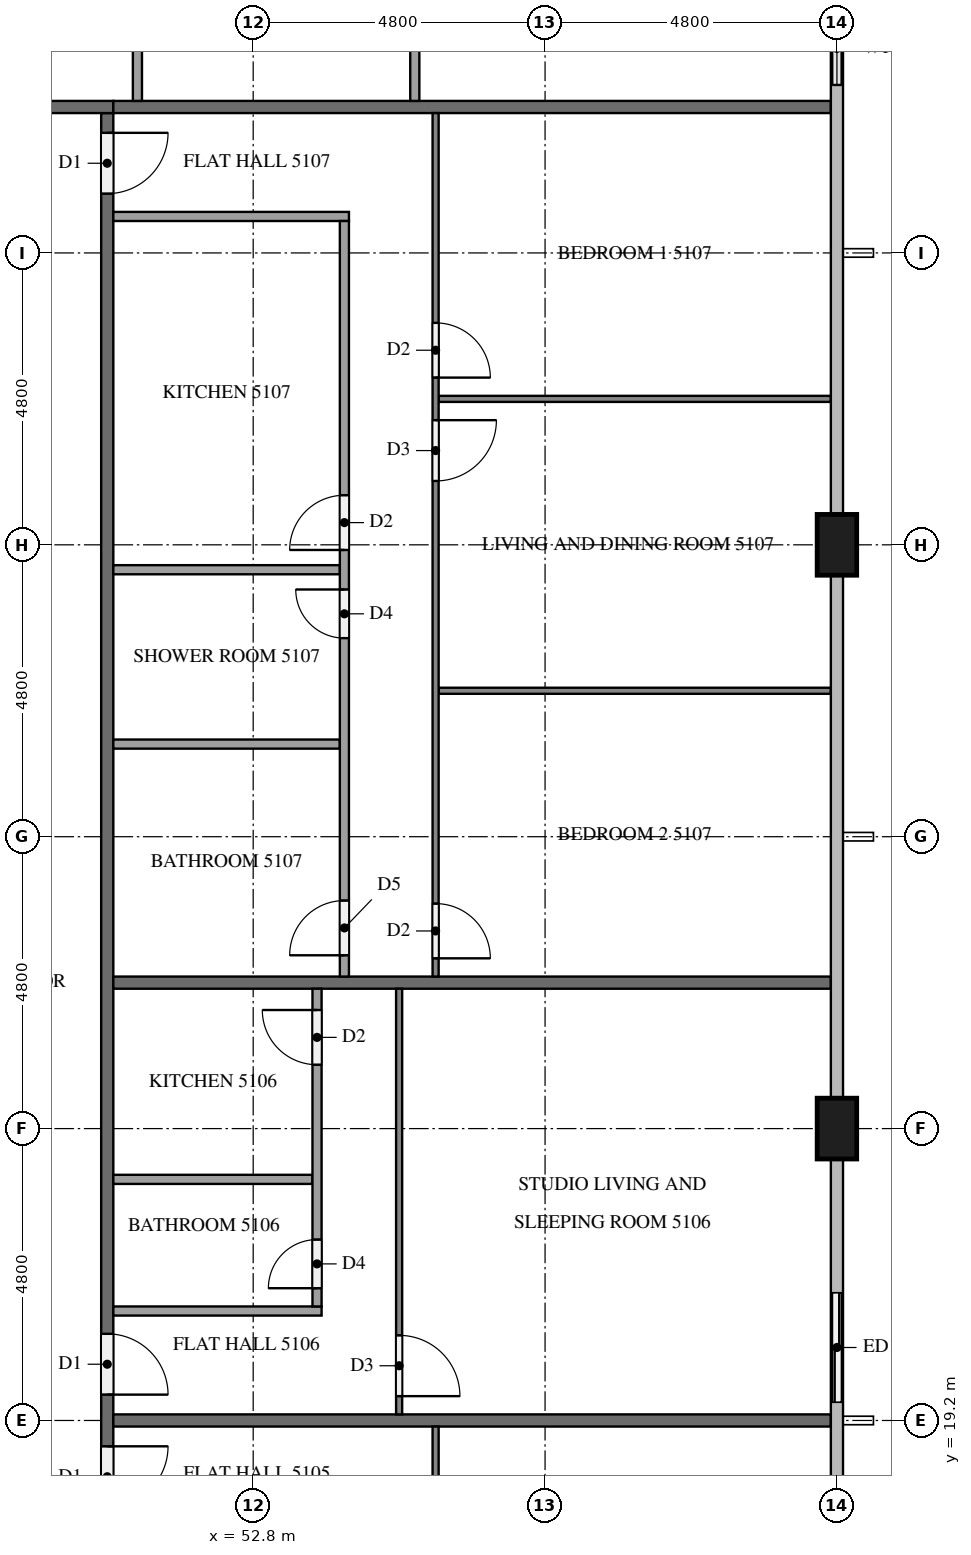
"""IFC4 building model, lengths in metres.
Left out: names, types, materials, properties, quantities, classifications, styles, units other than length and angle.
Written with IfcOpenShell. Run it as: python <this file> out.ifc"""

import sys

from ifc_helpers import new_model, si_unit, direction, frame, frame_2d, origin, origin_2d, place, context, subcontext, project, spatial, rectangle, extrude, element, fill, save


model = new_model("IFC4")
c1 = context("Model", 3, precision=1e-05, world=origin(), true_north=direction((0.0, 1.0)))
c2 = subcontext(c1, "Body", "Model", "MODEL_VIEW")
j1 = project(units=[si_unit("LENGTHUNIT", "METRE"), si_unit("PLANEANGLEUNIT", "RADIAN")], contexts=[c1])
p1 = place(None, origin())
s1 = spatial("IfcSite", under=j1, at=p1, CompositionType="ELEMENT")
p2 = place(p1, origin())
s2 = spatial("IfcBuilding", under=s1, at=p2, CompositionType="ELEMENT")
p3 = place(p2, frame((0.0, 0.0, 196.4)))
s3 = spatial("IfcBuildingStorey", under=s2, at=p3, CompositionType="ELEMENT", Elevation=196.4)
for number, where, z_axis, x_axis in (
    (1, (62.4, 24.0, 0.0), (0.0, 0.0, 1.0), (0.0, 1.0, 0.0)),
    (2, (62.4, 33.6, 0.0), (0.0, 0.0, 1.0), (0.0, 1.0, 0.0)),
):
    element("IfcColumn", number, at=place(p3, frame(where, z_axis=z_axis, x_axis=x_axis)), inside=s3, PredefinedType="COLUMN", context=c2, shape_type="SweptSolid", body=[
        extrude(rectangle(XDim=1.0, YDim=0.65, at=origin_2d()), origin(), (0.0, 0.0, 1.0), 3.2),
    ])
p4 = place(p3, frame((62.4, 19.2, 0.0), z_axis=(0.0, 0.0, 1.0), x_axis=(0.0, 1.0, 0.0)))
e3 = element("IfcWall", 3, at=p4, inside=s3, PredefinedType="SOLIDWALL", context=c2, shape_type="SweptSolid", body=[
    extrude(rectangle(XDim=2.4, YDim=0.15, at=frame_2d((1.2, 0.0))), origin(), (0.0, 0.0, 1.0), 3.2),
])
p5 = place(p4, frame((0.3, 0.0, 0.0)))
e4 = element("IfcOpeningElement", 4, at=p5, cuts=e3, PredefinedType="OPENING", context=c2, shape_type="SweptSolid", body=[
    extrude(rectangle(XDim=1.8, YDim=2.4, at=frame_2d((0.9, 1.2))), frame((0.0, 0.085, 0.0), z_axis=(0.0, -1.0, 0.0), x_axis=(1.0, 0.0, 0.0)), (0.0, 0.0, 1.0), 0.17),
])
p6 = place(p3, frame((62.4, 40.8, 0.0), z_axis=(0.0, 0.0, 1.0), x_axis=(0.0, 1.0, 0.0)))
e5 = element("IfcWall", 5, at=p6, inside=s3, PredefinedType="SOLIDWALL", context=c2, shape_type="SweptSolid", body=[
    extrude(rectangle(XDim=1.925, YDim=0.15, at=frame_2d((0.962, 0.0))), origin(), (0.0, 0.0, 1.0), 3.2),
])
p7 = place(p6, frame((0.363, 0.0, 0.9)))
e6 = element("IfcOpeningElement", 6, at=p7, cuts=e5, PredefinedType="OPENING", context=c2, shape_type="SweptSolid", body=[
    extrude(rectangle(XDim=1.2, YDim=1.4, at=frame_2d((0.6, 0.7))), frame((0.0, 0.085, 0.0), z_axis=(0.0, -1.0, 0.0), x_axis=(1.0, 0.0, 0.0)), (0.0, 0.0, 1.0), 0.17),
])
p8 = place(p3, frame((50.4, 40.7, 0.0), z_axis=(0.0, 0.0, 1.0), x_axis=(0.0, -1.0, 0.0)))
e7 = element("IfcWall", 7, at=p8, inside=s3, PredefinedType="PARTITIONING", context=c2, shape_type="SweptSolid", body=[
    extrude(rectangle(XDim=28.6, YDim=0.2, at=frame_2d((14.3, 0.0))), origin(), (0.0, 0.0, 1.0), 3.2),
])
p9 = place(p8, frame((21.925, 0.0, 0.0)))
e8 = element("IfcOpeningElement", 8, at=p9, cuts=e7, PredefinedType="OPENING", context=c2, shape_type="SweptSolid", body=[
    extrude(rectangle(XDim=1.0, YDim=2.1, at=frame_2d((0.5, 1.05))), frame((0.0, 0.11, 0.0), z_axis=(0.0, -1.0, 0.0), x_axis=(1.0, 0.0, 0.0)), (0.0, 0.0, 1.0), 0.22),
])
p10 = place(p8, frame((20.075, 0.0, 0.0)))
e9 = element("IfcOpeningElement", 9, at=p10, cuts=e7, PredefinedType="OPENING", context=c2, shape_type="SweptSolid", body=[
    extrude(rectangle(XDim=1.0, YDim=2.1, at=frame_2d((0.5, 1.05))), frame((0.0, 0.11, 0.0), z_axis=(0.0, -1.0, 0.0), x_axis=(1.0, 0.0, 0.0)), (0.0, 0.0, 1.0), 0.22),
])
p11 = place(p8, frame((0.325, 0.0, 0.0)))
e10 = element("IfcOpeningElement", 10, at=p11, cuts=e7, PredefinedType="OPENING", context=c2, shape_type="SweptSolid", body=[
    extrude(rectangle(XDim=1.0, YDim=2.1, at=frame_2d((0.5, 1.05))), frame((0.0, 0.11, 0.0), z_axis=(0.0, -1.0, 0.0), x_axis=(1.0, 0.0, 0.0)), (0.0, 0.0, 1.0), 0.22),
])
p12 = place(p3, frame((11.9, 40.8, 0.0), z_axis=(0.0, 0.0, 1.0), x_axis=(1.0, 0.0, 0.0)))
e11 = element("IfcWall", 11, at=p12, inside=s3, PredefinedType="PARTITIONING", context=c2, shape_type="SweptSolid", body=[
    extrude(rectangle(XDim=38.6, YDim=0.2, at=frame_2d((19.3, 0.0))), origin(), (0.0, 0.0, 1.0), 3.2),
])
p13 = place(p12, frame((34.125, 0.0, 0.0)))
e12 = element("IfcOpeningElement", 12, at=p13, cuts=e11, PredefinedType="OPENING", context=c2, shape_type="SweptSolid", body=[
    extrude(rectangle(XDim=1.0, YDim=2.1, at=frame_2d((0.5, 1.05))), frame((0.0, 0.11, 0.0), z_axis=(0.0, -1.0, 0.0), x_axis=(1.0, 0.0, 0.0)), (0.0, 0.0, 1.0), 0.22),
])
p14 = place(p12, frame((24.525, 0.0, 0.0)))
e13 = element("IfcOpeningElement", 13, at=p14, cuts=e11, PredefinedType="OPENING", context=c2, shape_type="SweptSolid", body=[
    extrude(rectangle(XDim=1.0, YDim=2.1, at=frame_2d((0.5, 1.05))), frame((0.0, 0.11, 0.0), z_axis=(0.0, -1.0, 0.0), x_axis=(1.0, 0.0, 0.0)), (0.0, 0.0, 1.0), 0.22),
])
p15 = place(p12, frame((7.725, 0.0, 0.0)))
e14 = element("IfcOpeningElement", 14, at=p15, cuts=e11, PredefinedType="OPENING", context=c2, shape_type="SweptSolid", body=[
    extrude(rectangle(XDim=1.0, YDim=2.1, at=frame_2d((0.5, 1.05))), frame((0.0, 0.11, 0.0), z_axis=(0.0, -1.0, 0.0), x_axis=(1.0, 0.0, 0.0)), (0.0, 0.0, 1.0), 0.22),
])
p16 = place(p12, frame((5.875, 0.0, 0.0)))
e15 = element("IfcOpeningElement", 15, at=p16, cuts=e11, PredefinedType="OPENING", context=c2, shape_type="SweptSolid", body=[
    extrude(rectangle(XDim=1.0, YDim=2.1, at=frame_2d((0.5, 1.05))), frame((0.0, 0.11, 0.0), z_axis=(0.0, -1.0, 0.0), x_axis=(1.0, 0.0, 0.0)), (0.0, 0.0, 1.0), 0.22),
])
for number, where, z_axis, x_axis in (
    (16, (50.5, 19.2, 0.0), (0.0, 0.0, 1.0), (1.0, 0.0, 0.0)),
    (17, (50.5, 26.4, 0.0), (0.0, 0.0, 1.0), (1.0, 0.0, 0.0)),
    (18, (50.5, 40.8, 0.0), (0.0, 0.0, 1.0), (1.0, 0.0, 0.0)),
):
    element("IfcWall", number, at=place(p3, frame(where, z_axis=z_axis, x_axis=x_axis)), inside=s3, PredefinedType="PARTITIONING", context=c2, shape_type="SweptSolid", body=[
        extrude(rectangle(XDim=11.8, YDim=0.2, at=frame_2d((5.9, 0.0))), origin(), (0.0, 0.0, 1.0), 3.2),
    ])
p17 = place(p3, frame((55.8, 19.1, 0.0), z_axis=(0.0, 0.0, 1.0), x_axis=(0.0, -1.0, 0.0)))
e19 = element("IfcWall", 19, at=p17, inside=s3, PredefinedType="PARTITIONING", context=c2, shape_type="SweptSolid", body=[
    extrude(rectangle(XDim=7.0, YDim=0.1, at=frame_2d((3.5, 0.0))), origin(), (0.0, 0.0, 1.0), 3.2),
])
p18 = place(p17, frame((5.7, 0.0, 0.0)))
e20 = element("IfcOpeningElement", 20, at=p18, cuts=e19, PredefinedType="OPENING", context=c2, shape_type="SweptSolid", body=[
    extrude(rectangle(XDim=1.0, YDim=2.1, at=frame_2d((0.5, 1.05))), frame((0.0, 0.06, 0.0), z_axis=(0.0, -1.0, 0.0), x_axis=(1.0, 0.0, 0.0)), (0.0, 0.0, 1.0), 0.12),
])
p19 = place(p3, frame((55.2, 26.3, 0.0), z_axis=(0.0, 0.0, 1.0), x_axis=(0.0, -1.0, 0.0)))
e21 = element("IfcWall", 21, at=p19, inside=s3, PredefinedType="PARTITIONING", context=c2, shape_type="SweptSolid", body=[
    extrude(rectangle(XDim=7.0, YDim=0.1, at=frame_2d((3.5, 0.0))), origin(), (0.0, 0.0, 1.0), 3.2),
])
p20 = place(p19, frame((5.7, 0.0, 0.0)))
e22 = element("IfcOpeningElement", 22, at=p20, cuts=e21, PredefinedType="OPENING", context=c2, shape_type="SweptSolid", body=[
    extrude(rectangle(XDim=1.0, YDim=2.1, at=frame_2d((0.5, 1.05))), frame((0.0, 0.06, 0.0), z_axis=(0.0, -1.0, 0.0), x_axis=(1.0, 0.0, 0.0)), (0.0, 0.0, 1.0), 0.12),
])
p21 = place(p3, frame((50.5, 23.165, 0.0), z_axis=(0.0, 0.0, 1.0), x_axis=(1.0, 0.0, 0.0)))
e23 = element("IfcWall", 23, at=p21, inside=s3, PredefinedType="PARTITIONING", context=c2, shape_type="SweptSolid", body=[
    extrude(rectangle(XDim=3.275, YDim=0.15, at=frame_2d((1.637, 0.0))), origin(), (0.0, 0.0, 1.0), 3.2),
])
p22 = place(p3, frame((50.5, 21.0, 0.0), z_axis=(0.0, 0.0, 1.0), x_axis=(1.0, 0.0, 0.0)))
e24 = element("IfcWall", 24, at=p22, inside=s3, PredefinedType="PARTITIONING", context=c2, shape_type="SweptSolid", body=[
    extrude(rectangle(XDim=3.425, YDim=0.15, at=frame_2d((1.712, 0.0))), origin(), (0.0, 0.0, 1.0), 3.2),
])
p23 = place(p3, frame((53.85, 21.075, 0.0), z_axis=(0.0, 0.0, 1.0), x_axis=(0.0, 1.0, 0.0)))
e25 = element("IfcWall", 25, at=p23, inside=s3, PredefinedType="PARTITIONING", context=c2, shape_type="SweptSolid", body=[
    extrude(rectangle(XDim=5.225, YDim=0.15, at=frame_2d((2.613, 0.0))), origin(), (0.0, 0.0, 1.0), 3.2),
])
p24 = place(p23, frame((0.3, 0.0, 0.0)))
e26 = element("IfcOpeningElement", 26, at=p24, cuts=e25, PredefinedType="OPENING", context=c2, shape_type="SweptSolid", body=[
    extrude(rectangle(XDim=0.8, YDim=2.1, at=frame_2d((0.4, 1.05))), frame((0.0, 0.085, 0.0), z_axis=(0.0, -1.0, 0.0), x_axis=(1.0, 0.0, 0.0)), (0.0, 0.0, 1.0), 0.17),
])
p25 = place(p23, frame((3.975, 0.0, 0.0)))
e27 = element("IfcOpeningElement", 27, at=p25, cuts=e25, PredefinedType="OPENING", context=c2, shape_type="SweptSolid", body=[
    extrude(rectangle(XDim=0.9, YDim=2.1, at=frame_2d((0.45, 1.05))), frame((0.0, 0.085, 0.0), z_axis=(0.0, -1.0, 0.0), x_axis=(1.0, 0.0, 0.0)), (0.0, 0.0, 1.0), 0.17),
])
for number, where, z_axis, x_axis in (
    (28, (55.85, 36.0, 0.0), (0.0, 0.0, 1.0), (1.0, 0.0, 0.0)),
    (29, (55.85, 31.2, 0.0), (0.0, 0.0, 1.0), (1.0, 0.0, 0.0)),
):
    element("IfcWall", number, at=place(p3, frame(where, z_axis=z_axis, x_axis=x_axis)), inside=s3, PredefinedType="PARTITIONING", context=c2, shape_type="SweptSolid", body=[
        extrude(rectangle(XDim=6.45, YDim=0.1, at=frame_2d((3.225, 0.0))), origin(), (0.0, 0.0, 1.0), 3.2),
    ])
p26 = place(p3, frame((55.8, 40.7, 0.0), z_axis=(0.0, 0.0, 1.0), x_axis=(0.0, -1.0, 0.0)))
e30 = element("IfcWall", 30, at=p26, inside=s3, PredefinedType="PARTITIONING", context=c2, shape_type="SweptSolid", body=[
    extrude(rectangle(XDim=14.2, YDim=0.1, at=frame_2d((7.1, 0.0))), origin(), (0.0, 0.0, 1.0), 3.2),
])
p27 = place(p26, frame((3.45, 0.0, 0.0)))
e31 = element("IfcOpeningElement", 31, at=p27, cuts=e30, PredefinedType="OPENING", context=c2, shape_type="SweptSolid", body=[
    extrude(rectangle(XDim=0.9, YDim=2.1, at=frame_2d((0.45, 1.05))), frame((0.0, 0.06, 0.0), z_axis=(0.0, -1.0, 0.0), x_axis=(1.0, 0.0, 0.0)), (0.0, 0.0, 1.0), 0.12),
])
p28 = place(p26, frame((5.05, 0.0, 0.0)))
e32 = element("IfcOpeningElement", 32, at=p28, cuts=e30, PredefinedType="OPENING", context=c2, shape_type="SweptSolid", body=[
    extrude(rectangle(XDim=1.0, YDim=2.1, at=frame_2d((0.5, 1.05))), frame((0.0, 0.06, 0.0), z_axis=(0.0, -1.0, 0.0), x_axis=(1.0, 0.0, 0.0)), (0.0, 0.0, 1.0), 0.12),
])
p29 = place(p26, frame((13.0, 0.0, 0.0)))
e33 = element("IfcOpeningElement", 33, at=p29, cuts=e30, PredefinedType="OPENING", context=c2, shape_type="SweptSolid", body=[
    extrude(rectangle(XDim=0.9, YDim=2.1, at=frame_2d((0.45, 1.05))), frame((0.0, 0.06, 0.0), z_axis=(0.0, -1.0, 0.0), x_axis=(1.0, 0.0, 0.0)), (0.0, 0.0, 1.0), 0.12),
])
for number, where, z_axis, x_axis in (
    (34, (50.5, 33.19, 0.0), (0.0, 0.0, 1.0), (1.0, 0.0, 0.0)),
    (35, (50.5, 30.323, 0.0), (0.0, 0.0, 1.0), (1.0, 0.0, 0.0)),
):
    element("IfcWall", number, at=place(p3, frame(where, z_axis=z_axis, x_axis=x_axis)), inside=s3, PredefinedType="PARTITIONING", context=c2, shape_type="SweptSolid", body=[
        extrude(rectangle(XDim=3.725, YDim=0.15, at=frame_2d((1.863, 0.0))), origin(), (0.0, 0.0, 1.0), 3.2),
    ])
p30 = place(p3, frame((50.5, 39.0, 0.0), z_axis=(0.0, 0.0, 1.0), x_axis=(1.0, 0.0, 0.0)))
e36 = element("IfcWall", 36, at=p30, inside=s3, PredefinedType="PARTITIONING", context=c2, shape_type="SweptSolid", body=[
    extrude(rectangle(XDim=3.875, YDim=0.15, at=frame_2d((1.938, 0.0))), origin(), (0.0, 0.0, 1.0), 3.2),
])
p31 = place(p3, frame((54.3, 26.5, 0.0), z_axis=(0.0, 0.0, 1.0), x_axis=(0.0, 1.0, 0.0)))
e37 = element("IfcWall", 37, at=p31, inside=s3, PredefinedType="PARTITIONING", context=c2, shape_type="SweptSolid", body=[
    extrude(rectangle(XDim=12.425, YDim=0.15, at=frame_2d((6.212, 0.0))), origin(), (0.0, 0.0, 1.0), 3.2),
])
p32 = place(p31, frame((7.015, 0.0, 0.0)))
e38 = element("IfcOpeningElement", 38, at=p32, cuts=e37, PredefinedType="OPENING", context=c2, shape_type="SweptSolid", body=[
    extrude(rectangle(XDim=0.9, YDim=2.1, at=frame_2d((0.45, 1.05))), frame((0.0, 0.085, 0.0), z_axis=(0.0, -1.0, 0.0), x_axis=(1.0, 0.0, 0.0)), (0.0, 0.0, 1.0), 0.17),
])
p33 = place(p31, frame((5.565, 0.0, 0.0)))
e39 = element("IfcOpeningElement", 39, at=p33, cuts=e37, PredefinedType="OPENING", context=c2, shape_type="SweptSolid", body=[
    extrude(rectangle(XDim=0.8, YDim=2.1, at=frame_2d((0.4, 1.05))), frame((0.0, 0.085, 0.0), z_axis=(0.0, -1.0, 0.0), x_axis=(1.0, 0.0, 0.0)), (0.0, 0.0, 1.0), 0.17),
])
p34 = place(p31, frame((0.35, 0.0, 0.0)))
e40 = element("IfcOpeningElement", 40, at=p34, cuts=e37, PredefinedType="OPENING", context=c2, shape_type="SweptSolid", body=[
    extrude(rectangle(XDim=0.9, YDim=2.1, at=frame_2d((0.45, 1.05))), frame((0.0, 0.085, 0.0), z_axis=(0.0, -1.0, 0.0), x_axis=(1.0, 0.0, 0.0)), (0.0, 0.0, 1.0), 0.17),
])
for number, where, z_axis, x_axis in (
    (41, (50.896, 40.9, 0.0), (0.0, 0.0, 1.0), (0.0, 1.0, 0.0)),
    (42, (55.458, 40.9, 0.0), (0.0, 0.0, 1.0), (0.0, 1.0, 0.0)),
):
    element("IfcWall", number, at=place(p3, frame(where, z_axis=z_axis, x_axis=x_axis)), inside=s3, PredefinedType="PARTITIONING", context=c2, shape_type="SweptSolid", body=[
        extrude(rectangle(XDim=1.925, YDim=0.15, at=frame_2d((0.962, 0.0))), origin(), (0.0, 0.0, 1.0), 3.2),
    ])
p35 = place(p5, origin())
e43 = element("IfcDoor", 43, at=p35, inside=s3, OperationType="SLIDING_TO_RIGHT", PredefinedType="DOOR", context=c2, shape_type="SweptSolid", body=[
    extrude(rectangle(XDim=1.8, YDim=2.4, at=frame_2d((0.9, 1.2))), frame((0.0, 0.025, 0.0), z_axis=(0.0, -1.0, 0.0), x_axis=(1.0, 0.0, 0.0)), (0.0, 0.0, 1.0), 0.05),
])
fill(e4, e43)
p36 = place(p7, origin())
e44 = element("IfcWindow", 44, at=p36, inside=s3, PartitioningType="SINGLE_PANEL", PredefinedType="WINDOW", context=c2, shape_type="SweptSolid", body=[
    extrude(rectangle(XDim=1.2, YDim=1.4, at=frame_2d((0.6, 0.7))), frame((0.0, 0.03, 0.0), z_axis=(0.0, -1.0, 0.0), x_axis=(1.0, 0.0, 0.0)), (0.0, 0.0, 1.0), 0.06),
])
fill(e6, e44)
p37 = place(p9, origin())
e45 = element("IfcDoor", 45, at=p37, inside=s3, OperationType="SINGLE_SWING_LEFT", PredefinedType="DOOR", context=c2, shape_type="SweptSolid", body=[
    extrude(rectangle(XDim=1.0, YDim=2.1, at=frame_2d((0.5, 1.05))), frame((0.0, 0.025, 0.0), z_axis=(0.0, -1.0, 0.0), x_axis=(1.0, 0.0, 0.0)), (0.0, 0.0, 1.0), 0.05),
])
fill(e8, e45)
p38 = place(p10, origin())
e46 = element("IfcDoor", 46, at=p38, inside=s3, OperationType="SINGLE_SWING_RIGHT", PredefinedType="DOOR", context=c2, shape_type="SweptSolid", body=[
    extrude(rectangle(XDim=1.0, YDim=2.1, at=frame_2d((0.5, 1.05))), frame((0.0, 0.025, 0.0), z_axis=(0.0, -1.0, 0.0), x_axis=(1.0, 0.0, 0.0)), (0.0, 0.0, 1.0), 0.05),
])
fill(e9, e46)
p39 = place(p11, origin())
e47 = element("IfcDoor", 47, at=p39, inside=s3, OperationType="SINGLE_SWING_LEFT", PredefinedType="DOOR", context=c2, shape_type="SweptSolid", body=[
    extrude(rectangle(XDim=1.0, YDim=2.1, at=frame_2d((0.5, 1.05))), frame((0.0, 0.025, 0.0), z_axis=(0.0, -1.0, 0.0), x_axis=(1.0, 0.0, 0.0)), (0.0, 0.0, 1.0), 0.05),
])
fill(e10, e47)
p40 = place(p20, origin())
e48 = element("IfcDoor", 48, at=p40, inside=s3, OperationType="SINGLE_SWING_RIGHT", PredefinedType="DOOR", context=c2, shape_type="SweptSolid", body=[
    extrude(rectangle(XDim=1.0, YDim=2.1, at=frame_2d((0.5, 1.05))), frame((0.0, 0.025, 0.0), z_axis=(0.0, -1.0, 0.0), x_axis=(1.0, 0.0, 0.0)), (0.0, 0.0, 1.0), 0.05),
])
fill(e22, e48)
p41 = place(p24, origin())
e49 = element("IfcDoor", 49, at=p41, inside=s3, OperationType="SINGLE_SWING_LEFT", PredefinedType="DOOR", context=c2, shape_type="SweptSolid", body=[
    extrude(rectangle(XDim=0.8, YDim=2.1, at=frame_2d((0.4, 1.05))), frame((0.0, 0.025, 0.0), z_axis=(0.0, -1.0, 0.0), x_axis=(1.0, 0.0, 0.0)), (0.0, 0.0, 1.0), 0.05),
])
fill(e26, e49)
p42 = place(p25, origin())
e50 = element("IfcDoor", 50, at=p42, inside=s3, OperationType="SINGLE_SWING_RIGHT", PredefinedType="DOOR", context=c2, shape_type="SweptSolid", body=[
    extrude(rectangle(XDim=0.9, YDim=2.1, at=frame_2d((0.45, 1.05))), frame((0.0, 0.025, 0.0), z_axis=(0.0, -1.0, 0.0), x_axis=(1.0, 0.0, 0.0)), (0.0, 0.0, 1.0), 0.05),
])
fill(e27, e50)
p43 = place(p27, origin())
e51 = element("IfcDoor", 51, at=p43, inside=s3, OperationType="SINGLE_SWING_RIGHT", PredefinedType="DOOR", context=c2, shape_type="SweptSolid", body=[
    extrude(rectangle(XDim=0.9, YDim=2.1, at=frame_2d((0.45, 1.05))), frame((0.0, 0.025, 0.0), z_axis=(0.0, -1.0, 0.0), x_axis=(1.0, 0.0, 0.0)), (0.0, 0.0, 1.0), 0.05),
])
fill(e31, e51)
p44 = place(p28, origin())
e52 = element("IfcDoor", 52, at=p44, inside=s3, OperationType="SINGLE_SWING_LEFT", PredefinedType="DOOR", context=c2, shape_type="SweptSolid", body=[
    extrude(rectangle(XDim=1.0, YDim=2.1, at=frame_2d((0.5, 1.05))), frame((0.0, 0.025, 0.0), z_axis=(0.0, -1.0, 0.0), x_axis=(1.0, 0.0, 0.0)), (0.0, 0.0, 1.0), 0.05),
])
fill(e32, e52)
p45 = place(p29, origin())
e53 = element("IfcDoor", 53, at=p45, inside=s3, OperationType="SINGLE_SWING_RIGHT", PredefinedType="DOOR", context=c2, shape_type="SweptSolid", body=[
    extrude(rectangle(XDim=0.9, YDim=2.1, at=frame_2d((0.45, 1.05))), frame((0.0, 0.025, 0.0), z_axis=(0.0, -1.0, 0.0), x_axis=(1.0, 0.0, 0.0)), (0.0, 0.0, 1.0), 0.05),
])
fill(e33, e53)
p46 = place(p32, origin())
e54 = element("IfcDoor", 54, at=p46, inside=s3, OperationType="SINGLE_SWING_LEFT", PredefinedType="DOOR", context=c2, shape_type="SweptSolid", body=[
    extrude(rectangle(XDim=0.9, YDim=2.1, at=frame_2d((0.45, 1.05))), frame((0.0, 0.025, 0.0), z_axis=(0.0, -1.0, 0.0), x_axis=(1.0, 0.0, 0.0)), (0.0, 0.0, 1.0), 0.05),
])
fill(e38, e54)
p47 = place(p33, origin())
e55 = element("IfcDoor", 55, at=p47, inside=s3, OperationType="SINGLE_SWING_RIGHT", PredefinedType="DOOR", context=c2, shape_type="SweptSolid", body=[
    extrude(rectangle(XDim=0.8, YDim=2.1, at=frame_2d((0.4, 1.05))), frame((0.0, 0.025, 0.0), z_axis=(0.0, -1.0, 0.0), x_axis=(1.0, 0.0, 0.0)), (0.0, 0.0, 1.0), 0.05),
])
fill(e39, e55)
p48 = place(p34, origin())
e56 = element("IfcDoor", 56, at=p48, inside=s3, OperationType="SINGLE_SWING_LEFT", PredefinedType="DOOR", context=c2, shape_type="SweptSolid", body=[
    extrude(rectangle(XDim=0.9, YDim=2.1, at=frame_2d((0.45, 1.05))), frame((0.0, 0.025, 0.0), z_axis=(0.0, -1.0, 0.0), x_axis=(1.0, 0.0, 0.0)), (0.0, 0.0, 1.0), 0.05),
])
fill(e40, e56)
save(model, sys.argv[1])
